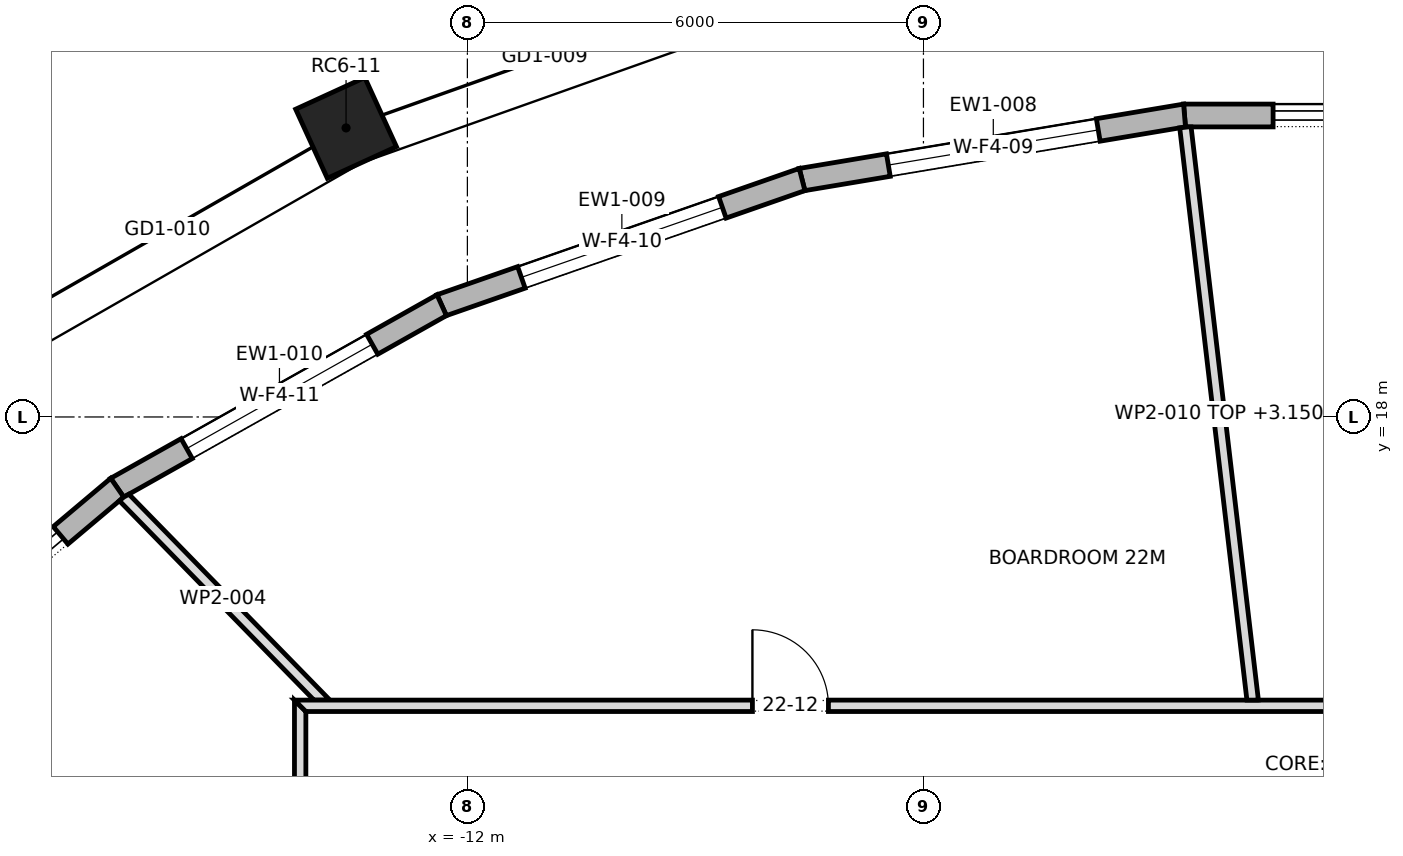
"""IFC4 building model, lengths in metres.
Left out: names, types, materials, properties, quantities, classifications, styles, units other than length and angle.
Written with IfcOpenShell. Run it as: python <this file> out.ifc"""

import sys

from ifc_helpers import new_model, si_unit, direction, frame, frame_2d, origin, origin_2d, place, context, subcontext, project, spatial, polyline, rectangle, outline, extrude, element, fill, save


model = new_model("IFC4")
c1 = context("Model", 3, precision=1e-05, world=origin(), true_north=direction((0.0, 1.0)))
c2 = subcontext(c1, "Body", "Model", "MODEL_VIEW")
j1 = project(units=[si_unit("LENGTHUNIT", "METRE"), si_unit("PLANEANGLEUNIT", "RADIAN")], contexts=[c1])
p1 = place(None, origin())
s1 = spatial("IfcSite", under=j1, at=p1, CompositionType="ELEMENT")
p2 = place(p1, origin())
s2 = spatial("IfcBuilding", under=s1, at=p2, CompositionType="ELEMENT")
p3 = place(p2, frame((0.0, 0.0, 304.3)))
s3 = spatial("IfcBuildingStorey", under=s2, at=p3, CompositionType="ELEMENT", Elevation=304.3)
p4 = place(p3, frame((-13.596, 21.803, 0.0), z_axis=(0.0, 0.0, 1.0), x_axis=(-0.909126368869, -0.416520402174, 0.0)))
e1 = element("IfcColumn", 1, at=p4, inside=s3, PredefinedType="COLUMN", context=c2, shape_type="SweptSolid", body=[
    extrude(rectangle(XDim=1.0, YDim=1.0, at=origin_2d()), origin(), (0.0, 0.0, 1.0), 4.0),
])
p5 = place(p3, frame((2.565, 21.966, 0.0), z_axis=(0.0, 0.0, 1.0), x_axis=(-1.0, 0.0, 0.0)))
e2 = element("IfcWall", 2, at=p5, inside=s3, PredefinedType="STANDARD", context=c2, shape_type="SweptSolid", body=[
    extrude(outline(polyline([(-0.012, -0.15), (5.143, -0.15), (5.118, 0.15), (0.012, 0.15), (-0.012, -0.15)])), origin(), (0.0, 0.0, 1.0), 3.7),
])
p6 = place(p5, frame((1.165, 0.0, 0.0)))
e3 = element("IfcOpeningElement", 3, at=p6, cuts=e2, PredefinedType="OPENING", context=c2, shape_type="SweptSolid", body=[
    extrude(rectangle(XDim=2.8, YDim=3.25, at=frame_2d((1.4, 1.625))), frame((0.0, 0.162, 0.0), z_axis=(0.0, -1.0, 0.0), x_axis=(1.0, 0.0, 0.0)), (0.0, 0.0, 1.0), 0.324),
])
p7 = place(p3, frame((-2.565, 21.966, 0.0), z_axis=(0.0, 0.0, 1.0), x_axis=(-0.986269480969, -0.165143909695, 0.0)))
e4 = element("IfcWall", 4, at=p7, inside=s3, PredefinedType="STANDARD", context=c2, shape_type="SweptSolid", body=[
    extrude(outline(polyline([(-0.012, -0.15), (5.115, -0.15), (5.089, 0.15), (0.012, 0.15), (-0.012, -0.15)])), origin(), (0.0, 0.0, 1.0), 3.7),
])
p8 = place(p7, frame((1.151, 0.0, 0.6)))
e5 = element("IfcOpeningElement", 5, at=p8, cuts=e4, PredefinedType="OPENING", context=c2, shape_type="SweptSolid", body=[
    extrude(rectangle(XDim=2.8, YDim=2.65, at=frame_2d((1.4, 1.325))), frame((0.0, 0.162, 0.0), z_axis=(0.0, -1.0, 0.0), x_axis=(1.0, 0.0, 0.0)), (0.0, 0.0, 1.0), 0.324),
])
p9 = place(p3, frame((-7.597, 21.124, 0.0), z_axis=(0.0, 0.0, 1.0), x_axis=(-0.944251863618, -0.329223963365, 0.0)))
e6 = element("IfcWall", 6, at=p9, inside=s3, PredefinedType="STANDARD", context=c2, shape_type="SweptSolid", body=[
    extrude(outline(polyline([(-0.013, -0.15), (5.034, -0.15), (5.008, 0.15), (0.013, 0.15), (-0.013, -0.15)])), origin(), (0.0, 0.0, 1.0), 3.7),
])
p10 = place(p9, frame((1.111, 0.0, 0.6)))
e7 = element("IfcOpeningElement", 7, at=p10, cuts=e6, PredefinedType="OPENING", context=c2, shape_type="SweptSolid", body=[
    extrude(rectangle(XDim=2.8, YDim=2.65, at=frame_2d((1.4, 1.325))), frame((0.0, 0.162, 0.0), z_axis=(0.0, -1.0, 0.0), x_axis=(1.0, 0.0, 0.0)), (0.0, 0.0, 1.0), 0.324),
])
p11 = place(p3, frame((-12.338, 19.471, 0.0), z_axis=(0.0, 0.0, 1.0), x_axis=(-0.871570211895, -0.490270706588, 0.0)))
e8 = element("IfcWall", 8, at=p11, inside=s3, PredefinedType="STANDARD", context=c2, shape_type="SweptSolid", body=[
    extrude(outline(polyline([(-0.013, -0.15), (4.912, -0.15), (4.883, 0.15), (0.013, 0.15), (-0.013, -0.15)])), origin(), (0.0, 0.0, 1.0), 3.7),
])
p12 = place(p11, frame((1.049, 0.0, 0.6)))
e9 = element("IfcOpeningElement", 9, at=p12, cuts=e8, PredefinedType="OPENING", context=c2, shape_type="SweptSolid", body=[
    extrude(rectangle(XDim=2.8, YDim=2.65, at=frame_2d((1.4, 1.325))), frame((0.0, 0.162, 0.0), z_axis=(0.0, -1.0, 0.0), x_axis=(1.0, 0.0, 0.0)), (0.0, 0.0, 1.0), 0.324),
])
p13 = place(p3, frame((-16.607, 17.07, 0.0), z_axis=(0.0, 0.0, 1.0), x_axis=(-0.765059193792, -0.643959959931, 0.0)))
e10 = element("IfcWall", 10, at=p13, inside=s3, PredefinedType="STANDARD", context=c2, shape_type="SweptSolid", body=[
    extrude(outline(polyline([(-0.014, -0.15), (4.763, -0.15), (4.733, 0.15), (0.014, 0.15), (-0.014, -0.15)])), origin(), (0.0, 0.0, 1.0), 3.7),
])
p14 = place(p13, frame((0.974, 0.0, 0.0)))
e11 = element("IfcOpeningElement", 11, at=p14, cuts=e10, PredefinedType="OPENING", context=c2, shape_type="SweptSolid", body=[
    extrude(rectangle(XDim=2.8, YDim=3.25, at=frame_2d((1.4, 1.625))), frame((0.0, 0.162, 0.0), z_axis=(0.0, -1.0, 0.0), x_axis=(1.0, 0.0, 0.0)), (0.0, 0.0, 1.0), 0.324),
])
p15 = place(p3, frame((-16.525, 16.95, 0.0), z_axis=(0.0, 0.0, 1.0), x_axis=(0.698599984797, -0.715512446602, 0.0)))
e12 = element("IfcWall", 12, at=p15, inside=s3, PredefinedType="PARTITIONING", context=c2, shape_type="SweptSolid", body=[
    extrude(outline(polyline([(0.0, -0.075), (1.833, -0.075), (3.665, -0.075), (3.811, 0.075), (3.811, 0.075), (1.918, 0.075), (0.025, 0.075), (0.005, 0.0), (0.0, -0.074), (0.0, -0.075)])), origin(), (0.0, 0.0, 1.0), 3.7),
])
p16 = place(p3, frame((-14.2, -14.275, 0.0), z_axis=(0.0, 0.0, 1.0), x_axis=(0.0, 1.0, 0.0)))
e13 = element("IfcWall", 13, at=p16, inside=s3, PredefinedType="PARTITIONING", context=c2, shape_type="SweptSolid", body=[
    extrude(outline(polyline([(0.15, -0.075), (2.033, -0.075), (3.917, -0.075), (5.8, -0.075), (7.683, -0.075), (9.567, -0.075), (11.45, -0.075), (13.333, -0.075), (15.217, -0.075), (17.1, -0.075), (18.983, -0.075), (20.866, -0.075), (22.75, -0.075), (24.633, -0.075), (26.517, -0.075), (28.4, -0.075), (28.55, 0.075), (28.55, 0.075), (26.646, 0.075), (24.743, 0.075), (22.84, 0.075), (20.937, 0.075), (19.033, 0.075), (17.13, 0.075), (15.227, 0.075), (13.323, 0.075), (11.42, 0.075), (9.517, 0.075), (7.613, 0.075), (5.71, 0.075), (3.807, 0.075), (1.903, 0.075), (0.0, 0.075), (0.15, -0.075)])), origin(), (0.0, 0.0, 1.0), 3.7),
])
p17 = place(p16, frame((21.465, 0.0, 0.0)))
e14 = element("IfcOpeningElement", 14, at=p17, cuts=e13, PredefinedType="OPENING", context=c2, shape_type="SweptSolid", body=[
    extrude(rectangle(XDim=1.0, YDim=2.1, at=frame_2d((0.5, 1.05))), frame((0.0, 0.087, 0.0), z_axis=(0.0, -1.0, 0.0), x_axis=(1.0, 0.0, 0.0)), (0.0, 0.0, 1.0), 0.174),
])
p18 = place(p16, frame((12.55, 0.0, 0.0)))
e15 = element("IfcOpeningElement", 15, at=p18, cuts=e13, PredefinedType="OPENING", context=c2, shape_type="SweptSolid", body=[
    extrude(rectangle(XDim=1.0, YDim=2.1, at=frame_2d((0.5, 1.05))), frame((0.0, 0.087, 0.0), z_axis=(0.0, -1.0, 0.0), x_axis=(1.0, 0.0, 0.0)), (0.0, 0.0, 1.0), 0.174),
])
p19 = place(p16, frame((7.055, 0.0, 0.0)))
e16 = element("IfcOpeningElement", 16, at=p19, cuts=e13, PredefinedType="OPENING", context=c2, shape_type="SweptSolid", body=[
    extrude(rectangle(XDim=1.0, YDim=2.1, at=frame_2d((0.5, 1.05))), frame((0.0, 0.087, 0.0), z_axis=(0.0, -1.0, 0.0), x_axis=(1.0, 0.0, 0.0)), (0.0, 0.0, 1.0), 0.174),
])
p20 = place(p3, frame((-14.275, 14.2, 0.0), z_axis=(0.0, 0.0, 1.0), x_axis=(1.0, 0.0, 0.0)))
e17 = element("IfcWall", 17, at=p20, inside=s3, PredefinedType="PARTITIONING", context=c2, shape_type="SweptSolid", body=[
    extrude(outline(polyline([(0.15, -0.075), (2.033, -0.075), (3.917, -0.075), (5.8, -0.075), (7.683, -0.075), (9.567, -0.075), (11.45, -0.075), (13.333, -0.075), (15.217, -0.075), (17.1, -0.075), (18.983, -0.075), (20.866, -0.075), (22.75, -0.075), (24.633, -0.075), (26.517, -0.075), (28.4, -0.075), (28.55, 0.075), (28.55, 0.075), (26.646, 0.075), (24.743, 0.075), (22.84, 0.075), (20.937, 0.075), (19.033, 0.075), (17.13, 0.075), (15.227, 0.075), (13.323, 0.075), (11.42, 0.075), (9.517, 0.075), (7.613, 0.075), (5.71, 0.075), (3.807, 0.075), (1.903, 0.075), (0.0, 0.075), (0.15, -0.075)])), origin(), (0.0, 0.0, 1.0), 3.7),
])
p21 = place(p20, frame((20.045, 0.0, 0.0)))
e18 = element("IfcOpeningElement", 18, at=p21, cuts=e17, PredefinedType="OPENING", context=c2, shape_type="SweptSolid", body=[
    extrude(rectangle(XDim=1.0, YDim=2.1, at=frame_2d((0.5, 1.05))), frame((0.0, 0.087, 0.0), z_axis=(0.0, -1.0, 0.0), x_axis=(1.0, 0.0, 0.0)), (0.0, 0.0, 1.0), 0.174),
])
p22 = place(p20, frame((6.025, 0.0, 0.0)))
e19 = element("IfcOpeningElement", 19, at=p22, cuts=e17, PredefinedType="OPENING", context=c2, shape_type="SweptSolid", body=[
    extrude(rectangle(XDim=1.0, YDim=2.1, at=frame_2d((0.5, 1.05))), frame((0.0, 0.087, 0.0), z_axis=(0.0, -1.0, 0.0), x_axis=(1.0, 0.0, 0.0)), (0.0, 0.0, 1.0), 0.174),
])
p23 = place(p3, frame((-1.668, 14.267, 0.0), z_axis=(0.0, 0.0, 1.0), x_axis=(-0.116619367809, 0.993176682696, 0.0)))
e20 = element("IfcWall", 20, at=p23, inside=s3, PredefinedType="PARTITIONING", context=c2, shape_type="SweptSolid", body=[
    extrude(outline(polyline([(0.0, -0.075), (1.898, -0.075), (3.796, -0.075), (5.695, -0.075), (7.593, -0.075), (7.597, -0.037), (7.597, 0.075), (5.702, 0.075), (3.807, 0.075), (1.912, 0.075), (0.017, 0.075), (0.0, -0.072), (0.0, -0.075)])), origin(), (0.0, 0.0, 1.0), 3.15),
])
p24 = place(p6, origin())
e21 = element("IfcDoor", 21, at=p24, inside=s3, OperationType="DOUBLE_DOOR_SLIDING", PredefinedType="DOOR", context=c2, shape_type="SweptSolid", body=[
    extrude(rectangle(XDim=2.8, YDim=3.25, at=frame_2d((1.4, 1.625))), frame((0.0, 0.025, 0.0), z_axis=(0.0, -1.0, 0.0), x_axis=(1.0, 0.0, 0.0)), (0.0, 0.0, 1.0), 0.05),
])
fill(e3, e21)
p25 = place(p8, origin())
e22 = element("IfcWindow", 22, at=p25, inside=s3, PartitioningType="DOUBLE_PANEL_VERTICAL", PredefinedType="WINDOW", context=c2, shape_type="SweptSolid", body=[
    extrude(rectangle(XDim=2.8, YDim=2.65, at=frame_2d((1.4, 1.325))), frame((0.0, 0.03, 0.0), z_axis=(0.0, -1.0, 0.0), x_axis=(1.0, 0.0, 0.0)), (0.0, 0.0, 1.0), 0.06),
])
fill(e5, e22)
p26 = place(p10, origin())
e23 = element("IfcWindow", 23, at=p26, inside=s3, PartitioningType="DOUBLE_PANEL_VERTICAL", PredefinedType="WINDOW", context=c2, shape_type="SweptSolid", body=[
    extrude(rectangle(XDim=2.8, YDim=2.65, at=frame_2d((1.4, 1.325))), frame((0.0, 0.03, 0.0), z_axis=(0.0, -1.0, 0.0), x_axis=(1.0, 0.0, 0.0)), (0.0, 0.0, 1.0), 0.06),
])
fill(e7, e23)
p27 = place(p12, origin())
e24 = element("IfcWindow", 24, at=p27, inside=s3, PartitioningType="DOUBLE_PANEL_VERTICAL", PredefinedType="WINDOW", context=c2, shape_type="SweptSolid", body=[
    extrude(rectangle(XDim=2.8, YDim=2.65, at=frame_2d((1.4, 1.325))), frame((0.0, 0.03, 0.0), z_axis=(0.0, -1.0, 0.0), x_axis=(1.0, 0.0, 0.0)), (0.0, 0.0, 1.0), 0.06),
])
fill(e9, e24)
p28 = place(p14, origin())
e25 = element("IfcDoor", 25, at=p28, inside=s3, OperationType="DOUBLE_DOOR_SLIDING", PredefinedType="DOOR", context=c2, shape_type="SweptSolid", body=[
    extrude(rectangle(XDim=2.8, YDim=3.25, at=frame_2d((1.4, 1.625))), frame((0.0, 0.025, 0.0), z_axis=(0.0, -1.0, 0.0), x_axis=(1.0, 0.0, 0.0)), (0.0, 0.0, 1.0), 0.05),
])
fill(e11, e25)
p29 = place(p22, origin())
e26 = element("IfcDoor", 26, at=p29, inside=s3, OperationType="SINGLE_SWING_RIGHT", PredefinedType="DOOR", context=c2, shape_type="SweptSolid", body=[
    extrude(rectangle(XDim=1.0, YDim=2.1, at=frame_2d((0.5, 1.05))), frame((0.0, 0.025, 0.0), z_axis=(0.0, -1.0, 0.0), x_axis=(1.0, 0.0, 0.0)), (0.0, 0.0, 1.0), 0.05),
])
fill(e19, e26)
save(model, sys.argv[1])
